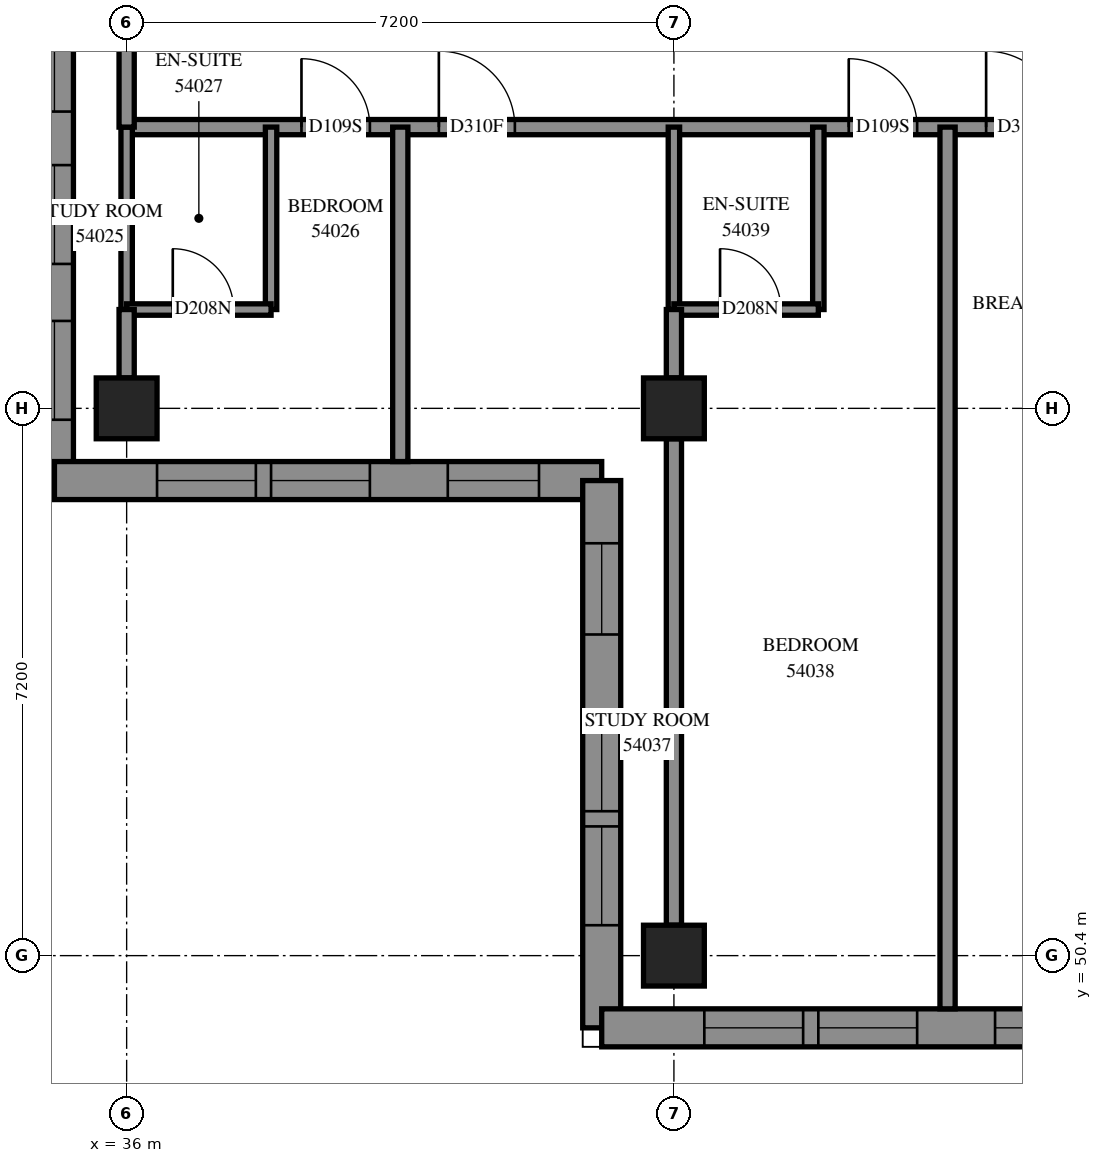
"""IFC4 building model, lengths in metres.
Left out: names, types, materials, properties, quantities, classifications, styles, units other than length and angle.
Written with IfcOpenShell. Run it as: python <this file> out.ifc"""

import sys

from ifc_helpers import new_model, si_unit, direction, frame, frame_2d, origin, origin_2d, place, context, subcontext, project, spatial, polyline, rectangle, outline, extrude, element, fill, save


model = new_model("IFC4")
c1 = context("Model", 3, precision=1e-05, world=origin(), true_north=direction((0.0, 1.0)))
c2 = subcontext(c1, "Body", "Model", "MODEL_VIEW")
j1 = project(units=[si_unit("LENGTHUNIT", "METRE"), si_unit("PLANEANGLEUNIT", "RADIAN")], contexts=[c1])
p1 = place(None, origin())
s1 = spatial("IfcSite", under=j1, at=p1, CompositionType="ELEMENT")
p2 = place(p1, origin())
s2 = spatial("IfcBuilding", under=s1, at=p2, CompositionType="ELEMENT")
p3 = place(p2, frame((0.0, 0.0, 199.8)))
s3 = spatial("IfcBuildingStorey", under=s2, at=p3, CompositionType="ELEMENT", Elevation=199.8)
for number, where, z_axis, x_axis in (
    (1, (36.0, 57.6, 0.0), (0.0, 0.0, 1.0), (1.0, 0.0, 0.0)),
    (2, (43.2, 50.4, 0.0), (0.0, 0.0, 1.0), (1.0, 0.0, 0.0)),
    (3, (43.2, 57.6, 0.0), (0.0, 0.0, 1.0), (1.0, 0.0, 0.0)),
):
    element("IfcColumn", number, at=place(p3, frame(where, z_axis=z_axis, x_axis=x_axis)), inside=s3, PredefinedType="COLUMN", context=c2, shape_type="SweptSolid", body=[
        extrude(rectangle(XDim=0.8, YDim=0.8, at=origin_2d()), origin(), (0.0, 0.0, 1.0), 3.1),
    ])
p4 = place(p3, frame((35.05, 62.859, 0.0), z_axis=(0.0, 0.0, 1.0), x_axis=(0.0, -1.0, 0.0)))
e4 = element("IfcWall", 4, at=p4, inside=s3, PredefinedType="SOLIDWALL", context=c2, shape_type="SweptSolid", body=[
    extrude(outline(polyline([(0.25, -0.25), (6.459, -0.25), (5.959, 0.25), (-0.25, 0.25), (0.25, -0.25)])), origin(), (0.0, 0.0, 1.0), 3.1),
])
p5 = place(p4, frame((2.059, 0.0, 0.45)))
e5 = element("IfcOpeningElement", 5, at=p5, cuts=e4, PredefinedType="OPENING", context=c2, shape_type="SweptSolid", body=[
    extrude(rectangle(XDim=1.3, YDim=2.5, at=frame_2d((0.65, 1.25))), frame((0.0, 0.26, 0.0), z_axis=(0.0, -1.0, 0.0), x_axis=(1.0, 0.0, 0.0)), (0.0, 0.0, 1.0), 0.52),
])
p6 = place(p4, frame((4.109, 0.0, 0.45)))
e6 = element("IfcOpeningElement", 6, at=p6, cuts=e4, PredefinedType="OPENING", context=c2, shape_type="SweptSolid", body=[
    extrude(rectangle(XDim=1.3, YDim=2.5, at=frame_2d((0.65, 1.25))), frame((0.0, 0.26, 0.0), z_axis=(0.0, -1.0, 0.0), x_axis=(1.0, 0.0, 0.0)), (0.0, 0.0, 1.0), 0.52),
])
p7 = place(p4, frame((0.354, 0.0, 0.45)))
e7 = element("IfcOpeningElement", 7, at=p7, cuts=e4, PredefinedType="OPENING", context=c2, shape_type="SweptSolid", body=[
    extrude(rectangle(XDim=1.0, YDim=2.5, at=frame_2d((0.5, 1.25))), frame((0.0, 0.26, 0.0), z_axis=(0.0, -1.0, 0.0), x_axis=(1.0, 0.0, 0.0)), (0.0, 0.0, 1.0), 0.52),
])
p8 = place(p3, frame((35.05, 56.65, 0.0), z_axis=(0.0, 0.0, 1.0), x_axis=(1.0, 0.0, 0.0)))
e8 = element("IfcWall", 8, at=p8, inside=s3, PredefinedType="SOLIDWALL", context=c2, shape_type="SweptSolid", body=[
    extrude(outline(polyline([(-0.25, -0.25), (6.95, -0.25), (7.45, 0.25), (0.25, 0.25), (-0.25, -0.25)])), origin(), (0.0, 0.0, 1.0), 3.1),
])
p9 = place(p8, frame((1.35, 0.0, 0.45)))
e9 = element("IfcOpeningElement", 9, at=p9, cuts=e8, PredefinedType="OPENING", context=c2, shape_type="SweptSolid", body=[
    extrude(rectangle(XDim=1.3, YDim=2.5, at=frame_2d((0.65, 1.25))), frame((0.0, 0.26, 0.0), z_axis=(0.0, -1.0, 0.0), x_axis=(1.0, 0.0, 0.0)), (0.0, 0.0, 1.0), 0.52),
])
p10 = place(p8, frame((2.85, 0.0, 0.45)))
e10 = element("IfcOpeningElement", 10, at=p10, cuts=e8, PredefinedType="OPENING", context=c2, shape_type="SweptSolid", body=[
    extrude(rectangle(XDim=1.3, YDim=2.5, at=frame_2d((0.65, 1.25))), frame((0.0, 0.26, 0.0), z_axis=(0.0, -1.0, 0.0), x_axis=(1.0, 0.0, 0.0)), (0.0, 0.0, 1.0), 0.52),
])
p11 = place(p8, frame((5.175, 0.0, 0.45)))
e11 = element("IfcOpeningElement", 11, at=p11, cuts=e8, PredefinedType="OPENING", context=c2, shape_type="SweptSolid", body=[
    extrude(rectangle(XDim=1.2, YDim=2.5, at=frame_2d((0.6, 1.25))), frame((0.0, 0.26, 0.0), z_axis=(0.0, -1.0, 0.0), x_axis=(1.0, 0.0, 0.0)), (0.0, 0.0, 1.0), 0.52),
])
p12 = place(p3, frame((42.25, 56.65, 0.0), z_axis=(0.0, 0.0, 1.0), x_axis=(0.0, -1.0, 0.0)))
e12 = element("IfcWall", 12, at=p12, inside=s3, PredefinedType="SOLIDWALL", context=c2, shape_type="SweptSolid", body=[
    extrude(outline(polyline([(0.25, -0.25), (7.45, -0.25), (6.95, 0.25), (-0.25, 0.25), (0.25, -0.25)])), origin(), (0.0, 0.0, 1.0), 3.1),
])
p13 = place(p12, frame((3.05, 0.0, 0.45)))
e13 = element("IfcOpeningElement", 13, at=p13, cuts=e12, PredefinedType="OPENING", context=c2, shape_type="SweptSolid", body=[
    extrude(rectangle(XDim=1.3, YDim=2.5, at=frame_2d((0.65, 1.25))), frame((0.0, 0.26, 0.0), z_axis=(0.0, -1.0, 0.0), x_axis=(1.0, 0.0, 0.0)), (0.0, 0.0, 1.0), 0.52),
])
p14 = place(p12, frame((4.55, 0.0, 0.45)))
e14 = element("IfcOpeningElement", 14, at=p14, cuts=e12, PredefinedType="OPENING", context=c2, shape_type="SweptSolid", body=[
    extrude(rectangle(XDim=1.3, YDim=2.5, at=frame_2d((0.65, 1.25))), frame((0.0, 0.26, 0.0), z_axis=(0.0, -1.0, 0.0), x_axis=(1.0, 0.0, 0.0)), (0.0, 0.0, 1.0), 0.52),
])
p15 = place(p12, frame((0.825, 0.0, 0.45)))
e15 = element("IfcOpeningElement", 15, at=p15, cuts=e12, PredefinedType="OPENING", context=c2, shape_type="SweptSolid", body=[
    extrude(rectangle(XDim=1.2, YDim=2.5, at=frame_2d((0.6, 1.25))), frame((0.0, 0.26, 0.0), z_axis=(0.0, -1.0, 0.0), x_axis=(1.0, 0.0, 0.0)), (0.0, 0.0, 1.0), 0.52),
])
p16 = place(p3, frame((42.25, 49.45, 0.0), z_axis=(0.0, 0.0, 1.0), x_axis=(1.0, 0.0, 0.0)))
e16 = element("IfcWall", 16, at=p16, inside=s3, PredefinedType="SOLIDWALL", context=c2, shape_type="SweptSolid", body=[
    extrude(outline(polyline([(-0.25, -0.25), (6.95, -0.25), (7.45, 0.25), (0.25, 0.25), (-0.25, -0.25)])), origin(), (0.0, 0.0, 1.0), 3.1),
])
p17 = place(p16, frame((1.35, 0.0, 0.45)))
e17 = element("IfcOpeningElement", 17, at=p17, cuts=e16, PredefinedType="OPENING", context=c2, shape_type="SweptSolid", body=[
    extrude(rectangle(XDim=1.3, YDim=2.5, at=frame_2d((0.65, 1.25))), frame((0.0, 0.26, 0.0), z_axis=(0.0, -1.0, 0.0), x_axis=(1.0, 0.0, 0.0)), (0.0, 0.0, 1.0), 0.52),
])
p18 = place(p16, frame((2.85, 0.0, 0.45)))
e18 = element("IfcOpeningElement", 18, at=p18, cuts=e16, PredefinedType="OPENING", context=c2, shape_type="SweptSolid", body=[
    extrude(rectangle(XDim=1.3, YDim=2.5, at=frame_2d((0.65, 1.25))), frame((0.0, 0.26, 0.0), z_axis=(0.0, -1.0, 0.0), x_axis=(1.0, 0.0, 0.0)), (0.0, 0.0, 1.0), 0.52),
])
p19 = place(p16, frame((5.175, 0.0, 0.45)))
e19 = element("IfcOpeningElement", 19, at=p19, cuts=e16, PredefinedType="OPENING", context=c2, shape_type="SweptSolid", body=[
    extrude(rectangle(XDim=1.2, YDim=2.5, at=frame_2d((0.6, 1.25))), frame((0.0, 0.26, 0.0), z_axis=(0.0, -1.0, 0.0), x_axis=(1.0, 0.0, 0.0)), (0.0, 0.0, 1.0), 0.52),
])
p20 = place(p3, frame((36.0, 61.3, 0.0), z_axis=(0.0, 0.0, 1.0), x_axis=(1.0, 0.0, 0.0)))
e20 = element("IfcWall", 20, at=p20, inside=s3, PredefinedType="PARTITIONING", context=c2, shape_type="SweptSolid", body=[
    extrude(rectangle(XDim=16.9, YDim=0.2, at=frame_2d((8.45, 0.0))), origin(), (0.0, 0.0, 1.0), 3.1),
])
p21 = place(p20, frame((2.3, 0.0, 0.0)))
e21 = element("IfcOpeningElement", 21, at=p21, cuts=e20, PredefinedType="OPENING", context=c2, shape_type="SweptSolid", body=[
    extrude(rectangle(XDim=0.9, YDim=2.1, at=frame_2d((0.45, 1.05))), frame((0.0, 0.11, 0.0), z_axis=(0.0, -1.0, 0.0), x_axis=(1.0, 0.0, 0.0)), (0.0, 0.0, 1.0), 0.22),
])
p22 = place(p20, frame((4.107, 0.0, 0.0)))
e22 = element("IfcOpeningElement", 22, at=p22, cuts=e20, PredefinedType="OPENING", context=c2, shape_type="SweptSolid", body=[
    extrude(rectangle(XDim=1.0, YDim=2.1, at=frame_2d((0.5, 1.05))), frame((0.0, 0.11, 0.0), z_axis=(0.0, -1.0, 0.0), x_axis=(1.0, 0.0, 0.0)), (0.0, 0.0, 1.0), 0.22),
])
p23 = place(p20, frame((9.5, 0.0, 0.0)))
e23 = element("IfcOpeningElement", 23, at=p23, cuts=e20, PredefinedType="OPENING", context=c2, shape_type="SweptSolid", body=[
    extrude(rectangle(XDim=0.9, YDim=2.1, at=frame_2d((0.45, 1.05))), frame((0.0, 0.11, 0.0), z_axis=(0.0, -1.0, 0.0), x_axis=(1.0, 0.0, 0.0)), (0.0, 0.0, 1.0), 0.22),
])
p24 = place(p20, frame((11.307, 0.0, 0.0)))
e24 = element("IfcOpeningElement", 24, at=p24, cuts=e20, PredefinedType="OPENING", context=c2, shape_type="SweptSolid", body=[
    extrude(rectangle(XDim=1.0, YDim=2.1, at=frame_2d((0.5, 1.05))), frame((0.0, 0.11, 0.0), z_axis=(0.0, -1.0, 0.0), x_axis=(1.0, 0.0, 0.0)), (0.0, 0.0, 1.0), 0.22),
])
p25 = place(p20, frame((15.647, 0.0, 0.0)))
e25 = element("IfcOpeningElement", 25, at=p25, cuts=e20, PredefinedType="OPENING", context=c2, shape_type="SweptSolid", body=[
    extrude(rectangle(XDim=1.0, YDim=2.1, at=frame_2d((0.5, 1.05))), frame((0.0, 0.11, 0.0), z_axis=(0.0, -1.0, 0.0), x_axis=(1.0, 0.0, 0.0)), (0.0, 0.0, 1.0), 0.22),
])
p26 = place(p3, frame((46.8, 49.7, 0.0), z_axis=(0.0, 0.0, 1.0), x_axis=(0.0, 1.0, 0.0)))
e26 = element("IfcWall", 26, at=p26, inside=s3, PredefinedType="PARTITIONING", context=c2, shape_type="SweptSolid", body=[
    extrude(rectangle(XDim=11.6, YDim=0.2, at=frame_2d((5.8, 0.0))), origin(), (0.0, 0.0, 1.0), 3.1),
])
p27 = place(p3, frame((43.2, 50.8, 0.0), z_axis=(0.0, 0.0, 1.0), x_axis=(0.0, 1.0, 0.0)))
e27 = element("IfcWall", 27, at=p27, inside=s3, PredefinedType="PARTITIONING", context=c2, shape_type="SweptSolid", body=[
    extrude(rectangle(XDim=6.4, YDim=0.2, at=frame_2d((3.2, 0.0))), origin(), (0.0, 0.0, 1.0), 2.6),
])
p28 = place(p3, frame((39.6, 56.9, 0.0), z_axis=(0.0, 0.0, 1.0), x_axis=(0.0, 1.0, 0.0)))
e28 = element("IfcWall", 28, at=p28, inside=s3, PredefinedType="PARTITIONING", context=c2, shape_type="SweptSolid", body=[
    extrude(rectangle(XDim=4.4, YDim=0.2, at=frame_2d((2.2, 0.0))), origin(), (0.0, 0.0, 1.0), 3.1),
])
p29 = place(p3, frame((37.9, 58.9, 0.0), z_axis=(0.0, 0.0, 1.0), x_axis=(0.0, 1.0, 0.0)))
e29 = element("IfcWall", 29, at=p29, inside=s3, PredefinedType="PARTITIONING", context=c2, shape_type="SweptSolid", body=[
    extrude(rectangle(XDim=2.4, YDim=0.15, at=frame_2d((1.2, 0.0))), origin(), (0.0, 0.0, 1.0), 3.1),
])
p30 = place(p3, frame((36.0, 58.9, 0.0), z_axis=(0.0, 0.0, 1.0), x_axis=(0.0, 1.0, 0.0)))
e30 = element("IfcWall", 30, at=p30, inside=s3, PredefinedType="PARTITIONING", context=c2, shape_type="SweptSolid", body=[
    extrude(rectangle(XDim=2.4, YDim=0.15, at=frame_2d((1.2, 0.0))), origin(), (0.0, 0.0, 1.0), 2.6),
])
for number, where, z_axis, x_axis in (
    (31, (45.1, 58.9, 0.0), (0.0, 0.0, 1.0), (0.0, 1.0, 0.0)),
    (32, (43.2, 58.9, 0.0), (0.0, 0.0, 1.0), (0.0, 1.0, 0.0)),
):
    element("IfcWall", number, at=place(p3, frame(where, z_axis=z_axis, x_axis=x_axis)), inside=s3, PredefinedType="PARTITIONING", context=c2, shape_type="SweptSolid", body=[
        extrude(rectangle(XDim=2.4, YDim=0.15, at=frame_2d((1.2, 0.0))), origin(), (0.0, 0.0, 1.0), 3.1),
    ])
p31 = place(p3, frame((36.0, 61.3, 0.0), z_axis=(0.0, 0.0, 1.0), x_axis=(0.0, 1.0, 0.0)))
e33 = element("IfcWall", 33, at=p31, inside=s3, PredefinedType="PARTITIONING", context=c2, shape_type="SweptSolid", body=[
    extrude(rectangle(XDim=2.2, YDim=0.2, at=frame_2d((1.1, 0.0))), origin(), (0.0, 0.0, 1.0), 2.6),
])
p32 = place(p3, frame((36.0, 58.9, 0.0), z_axis=(0.0, 0.0, 1.0), x_axis=(1.0, 0.0, 0.0)))
e34 = element("IfcWall", 34, at=p32, inside=s3, PredefinedType="PARTITIONING", context=c2, shape_type="SweptSolid", body=[
    extrude(rectangle(XDim=1.9, YDim=0.15, at=frame_2d((0.95, 0.0))), origin(), (0.0, 0.0, 1.0), 3.1),
])
p33 = place(p32, frame((0.607, 0.0, 0.0)))
e35 = element("IfcOpeningElement", 35, at=p33, cuts=e34, PredefinedType="OPENING", context=c2, shape_type="SweptSolid", body=[
    extrude(rectangle(XDim=0.8, YDim=2.1, at=frame_2d((0.4, 1.05))), frame((0.0, 0.085, 0.0), z_axis=(0.0, -1.0, 0.0), x_axis=(1.0, 0.0, 0.0)), (0.0, 0.0, 1.0), 0.17),
])
p34 = place(p3, frame((43.2, 58.9, 0.0), z_axis=(0.0, 0.0, 1.0), x_axis=(1.0, 0.0, 0.0)))
e36 = element("IfcWall", 36, at=p34, inside=s3, PredefinedType="PARTITIONING", context=c2, shape_type="SweptSolid", body=[
    extrude(rectangle(XDim=1.9, YDim=0.15, at=frame_2d((0.95, 0.0))), origin(), (0.0, 0.0, 1.0), 3.1),
])
p35 = place(p34, frame((0.607, 0.0, 0.0)))
e37 = element("IfcOpeningElement", 37, at=p35, cuts=e36, PredefinedType="OPENING", context=c2, shape_type="SweptSolid", body=[
    extrude(rectangle(XDim=0.8, YDim=2.1, at=frame_2d((0.4, 1.05))), frame((0.0, 0.085, 0.0), z_axis=(0.0, -1.0, 0.0), x_axis=(1.0, 0.0, 0.0)), (0.0, 0.0, 1.0), 0.17),
])
p36 = place(p3, frame((36.0, 58.0, 0.0), z_axis=(0.0, 0.0, 1.0), x_axis=(0.0, 1.0, 0.0)))
e38 = element("IfcWall", 38, at=p36, inside=s3, PredefinedType="PARTITIONING", context=c2, shape_type="SweptSolid", body=[
    extrude(rectangle(XDim=0.9, YDim=0.2, at=frame_2d((0.45, 0.0))), origin(), (0.0, 0.0, 1.0), 2.6),
])
p37 = place(p3, frame((43.2, 58.0, 0.0), z_axis=(0.0, 0.0, 1.0), x_axis=(0.0, 1.0, 0.0)))
e39 = element("IfcWall", 39, at=p37, inside=s3, PredefinedType="PARTITIONING", context=c2, shape_type="SweptSolid", body=[
    extrude(rectangle(XDim=0.9, YDim=0.2, at=frame_2d((0.45, 0.0))), origin(), (0.0, 0.0, 1.0), 3.1),
])
p38 = place(p5, origin())
e40 = element("IfcWindow", 40, at=p38, inside=s3, PartitioningType="SINGLE_PANEL", PredefinedType="WINDOW", context=c2, shape_type="SweptSolid", body=[
    extrude(rectangle(XDim=1.3, YDim=2.5, at=frame_2d((0.65, 1.25))), frame((0.0, 0.18, 0.0), z_axis=(0.0, -1.0, 0.0), x_axis=(1.0, 0.0, 0.0)), (0.0, 0.0, 1.0), 0.06),
])
fill(e5, e40)
p39 = place(p6, origin())
e41 = element("IfcWindow", 41, at=p39, inside=s3, PartitioningType="SINGLE_PANEL", PredefinedType="WINDOW", context=c2, shape_type="SweptSolid", body=[
    extrude(rectangle(XDim=1.3, YDim=2.5, at=frame_2d((0.65, 1.25))), frame((0.0, 0.18, 0.0), z_axis=(0.0, -1.0, 0.0), x_axis=(1.0, 0.0, 0.0)), (0.0, 0.0, 1.0), 0.06),
])
fill(e6, e41)
p40 = place(p9, origin())
e42 = element("IfcWindow", 42, at=p40, inside=s3, PartitioningType="SINGLE_PANEL", PredefinedType="WINDOW", context=c2, shape_type="SweptSolid", body=[
    extrude(rectangle(XDim=1.3, YDim=2.5, at=frame_2d((0.65, 1.25))), frame((0.0, 0.18, 0.0), z_axis=(0.0, -1.0, 0.0), x_axis=(1.0, 0.0, 0.0)), (0.0, 0.0, 1.0), 0.06),
])
fill(e9, e42)
p41 = place(p10, origin())
e43 = element("IfcWindow", 43, at=p41, inside=s3, PartitioningType="SINGLE_PANEL", PredefinedType="WINDOW", context=c2, shape_type="SweptSolid", body=[
    extrude(rectangle(XDim=1.3, YDim=2.5, at=frame_2d((0.65, 1.25))), frame((0.0, 0.18, 0.0), z_axis=(0.0, -1.0, 0.0), x_axis=(1.0, 0.0, 0.0)), (0.0, 0.0, 1.0), 0.06),
])
fill(e10, e43)
p42 = place(p11, origin())
e44 = element("IfcWindow", 44, at=p42, inside=s3, PartitioningType="SINGLE_PANEL", PredefinedType="WINDOW", context=c2, shape_type="SweptSolid", body=[
    extrude(rectangle(XDim=1.2, YDim=2.5, at=frame_2d((0.6, 1.25))), frame((0.0, 0.18, 0.0), z_axis=(0.0, -1.0, 0.0), x_axis=(1.0, 0.0, 0.0)), (0.0, 0.0, 1.0), 0.06),
])
fill(e11, e44)
p43 = place(p13, origin())
e45 = element("IfcWindow", 45, at=p43, inside=s3, PartitioningType="SINGLE_PANEL", PredefinedType="WINDOW", context=c2, shape_type="SweptSolid", body=[
    extrude(rectangle(XDim=1.3, YDim=2.5, at=frame_2d((0.65, 1.25))), frame((0.0, 0.18, 0.0), z_axis=(0.0, -1.0, 0.0), x_axis=(1.0, 0.0, 0.0)), (0.0, 0.0, 1.0), 0.06),
])
fill(e13, e45)
p44 = place(p14, origin())
e46 = element("IfcWindow", 46, at=p44, inside=s3, PartitioningType="SINGLE_PANEL", PredefinedType="WINDOW", context=c2, shape_type="SweptSolid", body=[
    extrude(rectangle(XDim=1.3, YDim=2.5, at=frame_2d((0.65, 1.25))), frame((0.0, 0.18, 0.0), z_axis=(0.0, -1.0, 0.0), x_axis=(1.0, 0.0, 0.0)), (0.0, 0.0, 1.0), 0.06),
])
fill(e14, e46)
p45 = place(p15, origin())
e47 = element("IfcWindow", 47, at=p45, inside=s3, PartitioningType="SINGLE_PANEL", PredefinedType="WINDOW", context=c2, shape_type="SweptSolid", body=[
    extrude(rectangle(XDim=1.2, YDim=2.5, at=frame_2d((0.6, 1.25))), frame((0.0, 0.18, 0.0), z_axis=(0.0, -1.0, 0.0), x_axis=(1.0, 0.0, 0.0)), (0.0, 0.0, 1.0), 0.06),
])
fill(e15, e47)
p46 = place(p17, origin())
e48 = element("IfcWindow", 48, at=p46, inside=s3, PartitioningType="SINGLE_PANEL", PredefinedType="WINDOW", context=c2, shape_type="SweptSolid", body=[
    extrude(rectangle(XDim=1.3, YDim=2.5, at=frame_2d((0.65, 1.25))), frame((0.0, 0.18, 0.0), z_axis=(0.0, -1.0, 0.0), x_axis=(1.0, 0.0, 0.0)), (0.0, 0.0, 1.0), 0.06),
])
fill(e17, e48)
p47 = place(p18, origin())
e49 = element("IfcWindow", 49, at=p47, inside=s3, PartitioningType="SINGLE_PANEL", PredefinedType="WINDOW", context=c2, shape_type="SweptSolid", body=[
    extrude(rectangle(XDim=1.3, YDim=2.5, at=frame_2d((0.65, 1.25))), frame((0.0, 0.18, 0.0), z_axis=(0.0, -1.0, 0.0), x_axis=(1.0, 0.0, 0.0)), (0.0, 0.0, 1.0), 0.06),
])
fill(e18, e49)
p48 = place(p19, origin())
e50 = element("IfcWindow", 50, at=p48, inside=s3, PartitioningType="SINGLE_PANEL", PredefinedType="WINDOW", context=c2, shape_type="SweptSolid", body=[
    extrude(rectangle(XDim=1.2, YDim=2.5, at=frame_2d((0.6, 1.25))), frame((0.0, 0.18, 0.0), z_axis=(0.0, -1.0, 0.0), x_axis=(1.0, 0.0, 0.0)), (0.0, 0.0, 1.0), 0.06),
])
fill(e19, e50)
p49 = place(p21, origin())
e51 = element("IfcDoor", 51, at=p49, inside=s3, OperationType="SINGLE_SWING_LEFT", PredefinedType="DOOR", context=c2, shape_type="SweptSolid", body=[
    extrude(rectangle(XDim=0.9, YDim=2.1, at=frame_2d((0.45, 1.05))), frame((0.0, 0.025, 0.0), z_axis=(0.0, -1.0, 0.0), x_axis=(1.0, 0.0, 0.0)), (0.0, 0.0, 1.0), 0.05),
])
fill(e21, e51)
p50 = place(p33, origin())
e52 = element("IfcDoor", 52, at=p50, inside=s3, OperationType="SINGLE_SWING_RIGHT", PredefinedType="DOOR", context=c2, shape_type="SweptSolid", body=[
    extrude(rectangle(XDim=0.8, YDim=2.1, at=frame_2d((0.4, 1.05))), frame((0.0, 0.025, 0.0), z_axis=(0.0, -1.0, 0.0), x_axis=(1.0, 0.0, 0.0)), (0.0, 0.0, 1.0), 0.05),
])
fill(e35, e52)
p51 = place(p22, origin())
e53 = element("IfcDoor", 53, at=p51, inside=s3, OperationType="SINGLE_SWING_RIGHT", PredefinedType="DOOR", context=c2, shape_type="SweptSolid", body=[
    extrude(rectangle(XDim=1.0, YDim=2.1, at=frame_2d((0.5, 1.05))), frame((0.0, 0.025, 0.0), z_axis=(0.0, -1.0, 0.0), x_axis=(1.0, 0.0, 0.0)), (0.0, 0.0, 1.0), 0.05),
])
fill(e22, e53)
p52 = place(p23, origin())
e54 = element("IfcDoor", 54, at=p52, inside=s3, OperationType="SINGLE_SWING_LEFT", PredefinedType="DOOR", context=c2, shape_type="SweptSolid", body=[
    extrude(rectangle(XDim=0.9, YDim=2.1, at=frame_2d((0.45, 1.05))), frame((0.0, 0.025, 0.0), z_axis=(0.0, -1.0, 0.0), x_axis=(1.0, 0.0, 0.0)), (0.0, 0.0, 1.0), 0.05),
])
fill(e23, e54)
p53 = place(p35, origin())
e55 = element("IfcDoor", 55, at=p53, inside=s3, OperationType="SINGLE_SWING_RIGHT", PredefinedType="DOOR", context=c2, shape_type="SweptSolid", body=[
    extrude(rectangle(XDim=0.8, YDim=2.1, at=frame_2d((0.4, 1.05))), frame((0.0, 0.025, 0.0), z_axis=(0.0, -1.0, 0.0), x_axis=(1.0, 0.0, 0.0)), (0.0, 0.0, 1.0), 0.05),
])
fill(e37, e55)
p54 = place(p24, origin())
e56 = element("IfcDoor", 56, at=p54, inside=s3, OperationType="SINGLE_SWING_RIGHT", PredefinedType="DOOR", context=c2, shape_type="SweptSolid", body=[
    extrude(rectangle(XDim=1.0, YDim=2.1, at=frame_2d((0.5, 1.05))), frame((0.0, 0.025, 0.0), z_axis=(0.0, -1.0, 0.0), x_axis=(1.0, 0.0, 0.0)), (0.0, 0.0, 1.0), 0.05),
])
fill(e24, e56)
p55 = place(p7, origin())
e57 = element("IfcWindow", 57, at=p55, inside=s3, PartitioningType="SINGLE_PANEL", PredefinedType="WINDOW", context=c2, shape_type="SweptSolid", body=[
    extrude(rectangle(XDim=1.0, YDim=2.5, at=frame_2d((0.5, 1.25))), frame((0.0, 0.18, 0.0), z_axis=(0.0, -1.0, 0.0), x_axis=(1.0, 0.0, 0.0)), (0.0, 0.0, 1.0), 0.06),
])
fill(e7, e57)
save(model, sys.argv[1])
